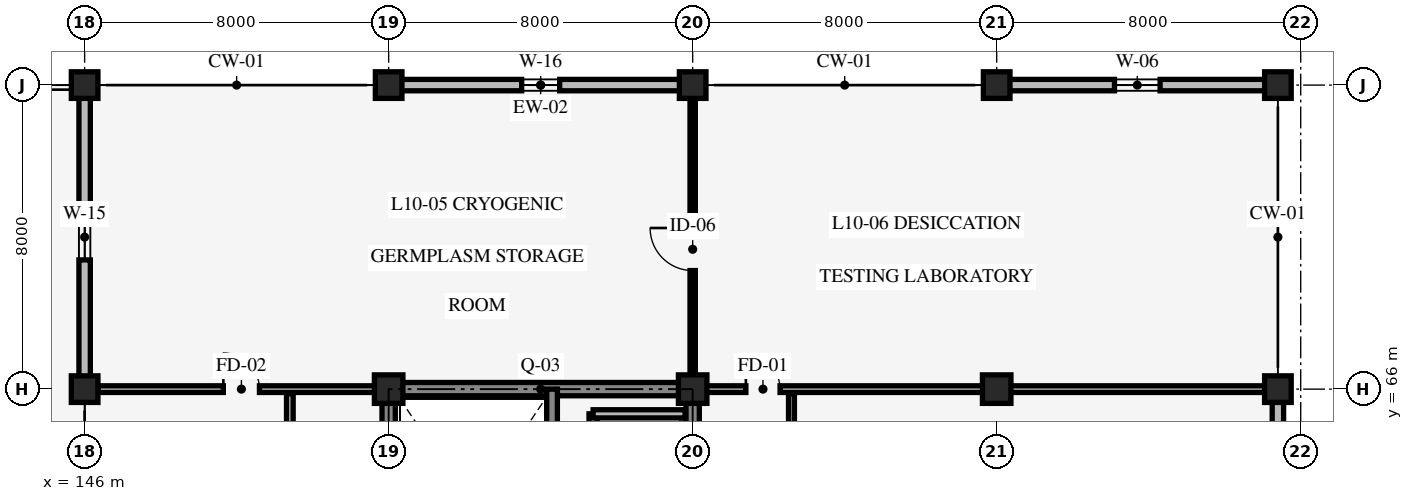
"""IFC4 building model, lengths in metres.
Left out: names, types, materials, properties, quantities, classifications, styles, units other than length and angle.
Written with IfcOpenShell. Run it as: python <this file> out.ifc"""

import sys

from ifc_helpers import new_model, si_unit, direction, frame, frame_2d, origin, origin_2d, place, context, subcontext, project, spatial, rectangle, extrude, element, fill, save


model = new_model("IFC4")
c1 = context("Model", 3, precision=1e-05, world=origin(), true_north=direction((0.0, 1.0)))
c2 = subcontext(c1, "Body", "Model", "MODEL_VIEW")
j1 = project(units=[si_unit("LENGTHUNIT", "METRE"), si_unit("PLANEANGLEUNIT", "RADIAN")], contexts=[c1])
p1 = place(None, origin())
s1 = spatial("IfcSite", under=j1, at=p1, CompositionType="ELEMENT")
p2 = place(p1, origin())
s2 = spatial("IfcBuilding", under=s1, at=p2, CompositionType="ELEMENT")
p3 = place(p2, frame((0.0, 0.0, 40.2)))
s3 = spatial("IfcBuildingStorey", under=s2, at=p3, CompositionType="ELEMENT", Elevation=40.2)
p4 = place(p3, frame((162.0, 58.0, 0.0), z_axis=(0.0, 0.0, 1.0), x_axis=(0.0, 1.0, 0.0)))
e1 = element("IfcWall", 1, at=p4, inside=s3, PredefinedType="SHEAR", context=c2, shape_type="SweptSolid", body=[
    extrude(rectangle(XDim=8.0, YDim=0.35, at=frame_2d((4.0, 0.0))), origin(), (0.0, 0.0, 1.0), 3.95),
])
p5 = place(p4, frame((3.275, 0.0, 0.0)))
e2 = element("IfcOpeningElement", 2, at=p5, cuts=e1, PredefinedType="OPENING", context=c2, shape_type="SweptSolid", body=[
    extrude(rectangle(XDim=1.05, YDim=2.2, at=frame_2d((0.525, 1.1))), frame((0.0, 0.185, 0.0), z_axis=(0.0, -1.0, 0.0), x_axis=(1.0, 0.0, 0.0)), (0.0, 0.0, 1.0), 0.37),
])
p6 = place(p4, frame((5.45, 0.0, 0.0)))
e3 = element("IfcOpeningElement", 3, at=p6, cuts=e1, PredefinedType="OPENING", context=c2, shape_type="SweptSolid", body=[
    extrude(rectangle(XDim=1.4, YDim=2.3, at=frame_2d((0.7, 1.15))), frame((0.0, 0.185, 0.0), z_axis=(0.0, -1.0, 0.0), x_axis=(1.0, 0.0, 0.0)), (0.0, 0.0, 1.0), 0.37),
])
for number, where, z_axis, x_axis in (
    (4, (162.0, 66.0, 0.0), (0.0, 0.0, 1.0), (-1.0, 0.0, 0.0)),
    (5, (154.0, 66.0, 0.0), (0.0, 0.0, 1.0), (0.0, -1.0, 0.0)),
):
    element("IfcWall", number, at=place(p3, frame(where, z_axis=z_axis, x_axis=x_axis)), inside=s3, PredefinedType="SHEAR", context=c2, shape_type="SweptSolid", body=[
        extrude(rectangle(XDim=8.0, YDim=0.35, at=frame_2d((4.0, 0.0))), origin(), (0.0, 0.0, 1.0), 3.95),
    ])
p7 = place(p3, frame((158.3, 58.0, 0.0), z_axis=(0.0, 0.0, 1.0), x_axis=(0.0, 1.0, 0.0)))
e6 = element("IfcWall", 6, at=p7, inside=s3, PredefinedType="SHEAR", context=c2, shape_type="SweptSolid", body=[
    extrude(rectangle(XDim=8.0, YDim=0.28, at=frame_2d((4.0, 0.0))), origin(), (0.0, 0.0, 1.0), 3.95),
])
for number, where, z_axis, x_axis in (
    (7, (146.0, 66.0, 0.0), (0.0, 0.0, 1.0), (1.0, 0.0, 0.0)),
    (8, (146.0, 74.0, 0.0), (0.0, 0.0, 1.0), (1.0, 0.0, 0.0)),
):
    element("IfcColumn", number, at=place(p3, frame(where, z_axis=z_axis, x_axis=x_axis)), inside=s3, PredefinedType="COLUMN", context=c2, shape_type="SweptSolid", body=[
        extrude(rectangle(XDim=0.7, YDim=0.7, at=origin_2d()), origin(), (0.0, 0.0, 1.0), 4.2),
    ])
p8 = place(p3, frame((154.0, 66.0, 0.0), z_axis=(0.0, 0.0, 1.0), x_axis=(1.0, 0.0, 0.0)))
e9 = element("IfcColumn", 9, at=p8, inside=s3, PredefinedType="COLUMN", context=c2, shape_type="SweptSolid", body=[
    extrude(rectangle(XDim=0.75, YDim=0.75, at=origin_2d()), origin(), (0.0, 0.0, 1.0), 4.2),
])
p9 = place(p3, frame((154.0, 74.0, 0.0), z_axis=(0.0, 0.0, 1.0), x_axis=(1.0, 0.0, 0.0)))
e10 = element("IfcColumn", 10, at=p9, inside=s3, PredefinedType="COLUMN", context=c2, shape_type="SweptSolid", body=[
    extrude(rectangle(XDim=0.7, YDim=0.7, at=origin_2d()), origin(), (0.0, 0.0, 1.0), 4.2),
])
p10 = place(p3, frame((162.0, 66.0, 0.0), z_axis=(0.0, 0.0, 1.0), x_axis=(1.0, 0.0, 0.0)))
e11 = element("IfcColumn", 11, at=p10, inside=s3, PredefinedType="COLUMN", context=c2, shape_type="SweptSolid", body=[
    extrude(rectangle(XDim=0.75, YDim=0.75, at=origin_2d()), origin(), (0.0, 0.0, 1.0), 4.2),
])
p11 = place(p3, frame((162.0, 74.0, 0.0), z_axis=(0.0, 0.0, 1.0), x_axis=(1.0, 0.0, 0.0)))
e12 = element("IfcColumn", 12, at=p11, inside=s3, PredefinedType="COLUMN", context=c2, shape_type="SweptSolid", body=[
    extrude(rectangle(XDim=0.7, YDim=0.7, at=origin_2d()), origin(), (0.0, 0.0, 1.0), 4.2),
])
p12 = place(p3, frame((170.0, 66.0, 0.0), z_axis=(0.0, 0.0, 1.0), x_axis=(1.0, 0.0, 0.0)))
e13 = element("IfcColumn", 13, at=p12, inside=s3, PredefinedType="COLUMN", context=c2, shape_type="SweptSolid", body=[
    extrude(rectangle(XDim=0.75, YDim=0.75, at=origin_2d()), origin(), (0.0, 0.0, 1.0), 4.2),
])
for number, where, z_axis, x_axis in (
    (14, (170.0, 74.0, 0.0), (0.0, 0.0, 1.0), (1.0, 0.0, 0.0)),
    (15, (177.4, 66.0, 0.0), (0.0, 0.0, 1.0), (1.0, 0.0, 0.0)),
    (16, (177.4, 74.0, 0.0), (0.0, 0.0, 1.0), (1.0, 0.0, 0.0)),
):
    element("IfcColumn", number, at=place(p3, frame(where, z_axis=z_axis, x_axis=x_axis)), inside=s3, PredefinedType="COLUMN", context=c2, shape_type="SweptSolid", body=[
        extrude(rectangle(XDim=0.7, YDim=0.7, at=origin_2d()), origin(), (0.0, 0.0, 1.0), 4.2),
    ])
p13 = place(p3, frame((146.0, 66.0, 0.0), z_axis=(0.0, 0.0, 1.0), x_axis=(0.0, 1.0, 0.0)))
e17 = element("IfcWall", 17, at=p13, inside=s3, PredefinedType="STANDARD", context=c2, shape_type="SweptSolid", body=[
    extrude(rectangle(XDim=8.0, YDim=0.3, at=frame_2d((4.0, 0.0))), origin(), (0.0, 0.0, 1.0), 3.14),
])
p14 = place(p13, frame((3.4, 0.0, 0.85)))
e18 = element("IfcOpeningElement", 18, at=p14, cuts=e17, PredefinedType="OPENING", context=c2, shape_type="SweptSolid", body=[
    extrude(rectangle(XDim=1.2, YDim=1.8, at=frame_2d((0.6, 0.9))), frame((0.0, 0.16, 0.0), z_axis=(0.0, -1.0, 0.0), x_axis=(1.0, 0.0, 0.0)), (0.0, 0.0, 1.0), 0.32),
])
p15 = place(p3, frame((154.0, 74.0, 0.0), z_axis=(0.0, 0.0, 1.0), x_axis=(1.0, 0.0, 0.0)))
e19 = element("IfcWall", 19, at=p15, inside=s3, PredefinedType="STANDARD", context=c2, shape_type="SweptSolid", body=[
    extrude(rectangle(XDim=8.0, YDim=0.3, at=frame_2d((4.0, 0.0))), origin(), (0.0, 0.0, 1.0), 3.09),
])
p16 = place(p15, frame((3.5, 0.0, 0.85)))
e20 = element("IfcOpeningElement", 20, at=p16, cuts=e19, PredefinedType="OPENING", context=c2, shape_type="SweptSolid", body=[
    extrude(rectangle(XDim=1.0, YDim=1.5, at=frame_2d((0.5, 0.75))), frame((0.0, 0.16, 0.0), z_axis=(0.0, -1.0, 0.0), x_axis=(1.0, 0.0, 0.0)), (0.0, 0.0, 1.0), 0.32),
])
p17 = place(p3, frame((170.0, 74.0, 0.0), z_axis=(0.0, 0.0, 1.0), x_axis=(1.0, 0.0, 0.0)))
e21 = element("IfcWall", 21, at=p17, inside=s3, PredefinedType="STANDARD", context=c2, shape_type="SweptSolid", body=[
    extrude(rectangle(XDim=7.4, YDim=0.3, at=frame_2d((3.7, 0.0))), origin(), (0.0, 0.0, 1.0), 3.09),
])
p18 = place(p17, frame((3.1, 0.0, 0.85)))
e22 = element("IfcOpeningElement", 22, at=p18, cuts=e21, PredefinedType="OPENING", context=c2, shape_type="SweptSolid", body=[
    extrude(rectangle(XDim=1.2, YDim=1.2, at=frame_2d((0.6, 0.6))), frame((0.0, 0.16, 0.0), z_axis=(0.0, -1.0, 0.0), x_axis=(1.0, 0.0, 0.0)), (0.0, 0.0, 1.0), 0.32),
])
p19 = place(p3, frame((177.4, 66.0, 0.0), z_axis=(0.0, 0.0, 1.0), x_axis=(0.0, -1.0, 0.0)))
e23 = element("IfcWall", 23, at=p19, inside=s3, PredefinedType="STANDARD", context=c2, shape_type="SweptSolid", body=[
    extrude(rectangle(XDim=8.0, YDim=0.3, at=frame_2d((4.0, 0.0))), origin(), (0.0, 0.0, 1.0), 3.14),
])
p20 = place(p19, frame((2.85, 0.0, 0.85)))
e24 = element("IfcOpeningElement", 24, at=p20, cuts=e23, PredefinedType="OPENING", context=c2, shape_type="SweptSolid", body=[
    extrude(rectangle(XDim=2.3, YDim=1.5, at=frame_2d((1.15, 0.75))), frame((0.0, 0.16, 0.0), z_axis=(0.0, -1.0, 0.0), x_axis=(1.0, 0.0, 0.0)), (0.0, 0.0, 1.0), 0.32),
])
p21 = place(p3, frame((159.38, 62.9, 0.0), z_axis=(0.0, 0.0, 1.0), x_axis=(0.0, 1.0, 0.0)))
e25 = element("IfcWall", 25, at=p21, inside=s3, PredefinedType="STANDARD", context=c2, shape_type="SweptSolid", body=[
    extrude(rectangle(XDim=2.45, YDim=0.215, at=frame_2d((1.225, 0.0))), origin(), (0.0, 0.0, 1.0), 3.9),
])
p22 = place(p3, frame((159.38, 65.35, 0.0), z_axis=(0.0, 0.0, 1.0), x_axis=(1.0, 0.0, 0.0)))
e26 = element("IfcWall", 26, at=p22, inside=s3, PredefinedType="STANDARD", context=c2, shape_type="SweptSolid", body=[
    extrude(rectangle(XDim=2.42, YDim=0.215, at=frame_2d((1.21, 0.0))), origin(), (0.0, 0.0, 1.0), 3.9),
])
p23 = place(p3, frame((151.4, 58.12, 0.0), z_axis=(0.0, 0.0, 1.0), x_axis=(0.0, 1.0, 0.0)))
e27 = element("IfcWall", 27, at=p23, inside=s3, PredefinedType="STANDARD", context=c2, shape_type="SweptSolid", body=[
    extrude(rectangle(XDim=7.76, YDim=0.175, at=frame_2d((3.88, 0.0))), origin(), (0.0, 0.0, 1.0), 3.9),
])
p24 = place(p23, frame((3.13, 0.0, 0.0)))
e28 = element("IfcOpeningElement", 28, at=p24, cuts=e27, PredefinedType="OPENING", context=c2, shape_type="SweptSolid", body=[
    extrude(rectangle(XDim=1.5, YDim=2.2, at=frame_2d((0.75, 1.1))), frame((0.0, 0.098, 0.0), z_axis=(0.0, -1.0, 0.0), x_axis=(1.0, 0.0, 0.0)), (0.0, 0.0, 1.0), 0.195),
])
p25 = place(p3, frame((164.6, 58.08, 0.0), z_axis=(0.0, 0.0, 1.0), x_axis=(0.0, 1.0, 0.0)))
e29 = element("IfcWall", 29, at=p25, inside=s3, PredefinedType="STANDARD", context=c2, shape_type="SweptSolid", body=[
    extrude(rectangle(XDim=7.8, YDim=0.155, at=frame_2d((3.9, 0.0))), origin(), (0.0, 0.0, 1.0), 3.9),
])
p26 = place(p25, frame((3.35, 0.0, 0.0)))
e30 = element("IfcOpeningElement", 30, at=p26, cuts=e29, PredefinedType="OPENING", context=c2, shape_type="SweptSolid", body=[
    extrude(rectangle(XDim=1.1, YDim=2.1, at=frame_2d((0.55, 1.05))), frame((0.0, 0.087, 0.0), z_axis=(0.0, -1.0, 0.0), x_axis=(1.0, 0.0, 0.0)), (0.0, 0.0, 1.0), 0.175),
])
p27 = place(p3, frame((146.35, 66.0, 0.0), z_axis=(0.0, 0.0, 1.0), x_axis=(1.0, 0.0, 0.0)))
e31 = element("IfcWall", 31, at=p27, inside=s3, PredefinedType="STANDARD", context=c2, shape_type="SweptSolid", body=[
    extrude(rectangle(XDim=7.3, YDim=0.175, at=frame_2d((3.65, 0.0))), origin(), (0.0, 0.0, 1.0), 3.09),
])
p28 = place(p27, frame((3.3, 0.0, 0.0)))
e32 = element("IfcOpeningElement", 32, at=p28, cuts=e31, PredefinedType="OPENING", context=c2, shape_type="SweptSolid", body=[
    extrude(rectangle(XDim=0.95, YDim=2.1, at=frame_2d((0.475, 1.05))), frame((0.0, 0.098, 0.0), z_axis=(0.0, -1.0, 0.0), x_axis=(1.0, 0.0, 0.0)), (0.0, 0.0, 1.0), 0.195),
])
p29 = place(p3, frame((162.0, 66.12, 0.0), z_axis=(0.0, 0.0, 1.0), x_axis=(0.0, 1.0, 0.0)))
e33 = element("IfcWall", 33, at=p29, inside=s3, PredefinedType="STANDARD", context=c2, shape_type="SweptSolid", body=[
    extrude(rectangle(XDim=7.83, YDim=0.14, at=frame_2d((3.915, 0.0))), origin(), (0.0, 0.0, 1.0), 3.14),
])
p30 = place(p29, frame((3.0, 0.0, 0.0)))
e34 = element("IfcOpeningElement", 34, at=p30, cuts=e33, PredefinedType="OPENING", context=c2, shape_type="SweptSolid", body=[
    extrude(rectangle(XDim=1.12, YDim=2.12, at=frame_2d((0.56, 1.06))), frame((0.0, 0.08, 0.0), z_axis=(0.0, -1.0, 0.0), x_axis=(1.0, 0.0, 0.0)), (0.0, 0.0, 1.0), 0.16),
])
p31 = place(p3, frame((162.35, 66.0, 0.0), z_axis=(0.0, 0.0, 1.0), x_axis=(1.0, 0.0, 0.0)))
e35 = element("IfcWall", 35, at=p31, inside=s3, PredefinedType="STANDARD", context=c2, shape_type="SweptSolid", body=[
    extrude(rectangle(XDim=14.7, YDim=0.175, at=frame_2d((7.35, 0.0))), origin(), (0.0, 0.0, 1.0), 3.09),
])
p32 = place(p31, frame((1.05, 0.0, 0.0)))
e36 = element("IfcOpeningElement", 36, at=p32, cuts=e35, PredefinedType="OPENING", context=c2, shape_type="SweptSolid", body=[
    extrude(rectangle(XDim=0.9, YDim=2.1, at=frame_2d((0.45, 1.05))), frame((0.0, 0.098, 0.0), z_axis=(0.0, -1.0, 0.0), x_axis=(1.0, 0.0, 0.0)), (0.0, 0.0, 1.0), 0.195),
])
p33 = place(p14, origin())
e37 = element("IfcWindow", 37, at=p33, inside=s3, PartitioningType="SINGLE_PANEL", PredefinedType="WINDOW", context=c2, shape_type="SweptSolid", body=[
    extrude(rectangle(XDim=1.2, YDim=1.8, at=frame_2d((0.6, 0.9))), frame((0.0, 0.03, 0.0), z_axis=(0.0, -1.0, 0.0), x_axis=(1.0, 0.0, 0.0)), (0.0, 0.0, 1.0), 0.06),
])
fill(e18, e37)
p34 = place(p16, origin())
e38 = element("IfcWindow", 38, at=p34, inside=s3, PartitioningType="SINGLE_PANEL", PredefinedType="WINDOW", context=c2, shape_type="SweptSolid", body=[
    extrude(rectangle(XDim=1.0, YDim=1.5, at=frame_2d((0.5, 0.75))), frame((0.0, 0.03, 0.0), z_axis=(0.0, -1.0, 0.0), x_axis=(1.0, 0.0, 0.0)), (0.0, 0.0, 1.0), 0.06),
])
fill(e20, e38)
p35 = place(p18, origin())
e39 = element("IfcWindow", 39, at=p35, inside=s3, PartitioningType="SINGLE_PANEL", PredefinedType="WINDOW", context=c2, shape_type="SweptSolid", body=[
    extrude(rectangle(XDim=1.2, YDim=1.2, at=frame_2d((0.6, 0.6))), frame((0.0, 0.03, 0.0), z_axis=(0.0, -1.0, 0.0), x_axis=(1.0, 0.0, 0.0)), (0.0, 0.0, 1.0), 0.06),
])
fill(e22, e39)
p36 = place(p28, origin())
e40 = element("IfcDoor", 40, at=p36, inside=s3, OperationType="SINGLE_SWING_LEFT", PredefinedType="DOOR", context=c2, shape_type="SweptSolid", body=[
    extrude(rectangle(XDim=0.95, YDim=2.1, at=frame_2d((0.475, 1.05))), frame((0.0, 0.025, 0.0), z_axis=(0.0, -1.0, 0.0), x_axis=(1.0, 0.0, 0.0)), (0.0, 0.0, 1.0), 0.05),
])
fill(e32, e40)
p37 = place(p30, origin())
e41 = element("IfcDoor", 41, at=p37, inside=s3, OperationType="SINGLE_SWING_RIGHT", PredefinedType="DOOR", context=c2, shape_type="SweptSolid", body=[
    extrude(rectangle(XDim=1.12, YDim=2.12, at=frame_2d((0.56, 1.06))), frame((0.0, 0.025, 0.0), z_axis=(0.0, -1.0, 0.0), x_axis=(1.0, 0.0, 0.0)), (0.0, 0.0, 1.0), 0.05),
])
fill(e34, e41)
p38 = place(p32, origin())
e42 = element("IfcDoor", 42, at=p38, inside=s3, OperationType="SINGLE_SWING_LEFT", PredefinedType="DOOR", context=c2, shape_type="SweptSolid", body=[
    extrude(rectangle(XDim=0.9, YDim=2.1, at=frame_2d((0.45, 1.05))), frame((0.0, 0.025, 0.0), z_axis=(0.0, -1.0, 0.0), x_axis=(1.0, 0.0, 0.0)), (0.0, 0.0, 1.0), 0.05),
])
fill(e36, e42)
save(model, sys.argv[1])
